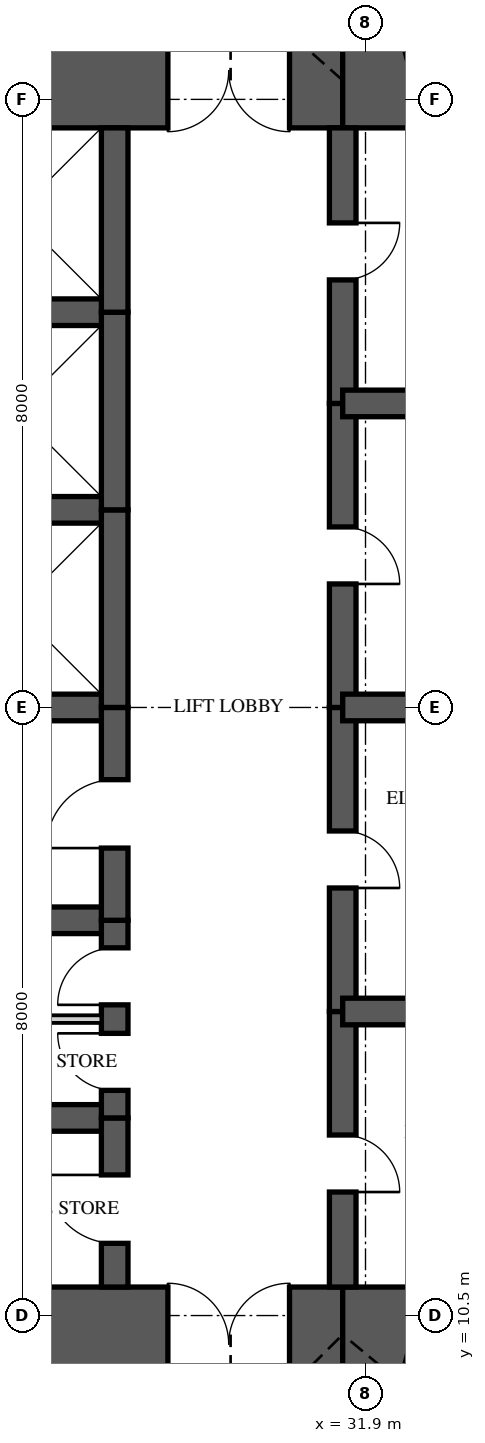
"""IFC4 building model, lengths in metres.
Left out: names, types, materials, properties, quantities, classifications, styles, units other than length and angle.
Written with IfcOpenShell. Run it as: python <this file> out.ifc"""

import sys

from ifc_helpers import new_model, si_unit, direction, frame, frame_2d, origin, place, context, subcontext, project, spatial, rectangle, extrude, element, fill, save


model = new_model("IFC4")
c1 = context("Model", 3, precision=1e-05, world=origin(), true_north=direction((0.0, 1.0)))
c2 = subcontext(c1, "Body", "Model", "MODEL_VIEW")
j1 = project(units=[si_unit("LENGTHUNIT", "METRE"), si_unit("PLANEANGLEUNIT", "RADIAN")], contexts=[c1])
p1 = place(None, origin())
s1 = spatial("IfcSite", under=j1, at=p1, CompositionType="ELEMENT")
p2 = place(p1, origin())
s2 = spatial("IfcBuilding", under=s1, at=p2, CompositionType="ELEMENT")
p3 = place(p2, frame((0.0, 0.0, 149.35)))
s3 = spatial("IfcBuildingStorey", under=s2, at=p3, CompositionType="ELEMENT", Elevation=149.35)
p4 = place(p3, frame((26.0, 10.125, 0.0), z_axis=(0.0, 0.0, 1.0), x_axis=(1.0, 0.0, 0.0)))
e1 = element("IfcWall", 1, at=p4, inside=s3, PredefinedType="SHEAR", context=c2, shape_type="SweptSolid", body=[
    extrude(rectangle(XDim=5.6, YDim=1.5, at=frame_2d((2.8, 0.0))), origin(), (0.0, 0.0, 1.0), 5.0),
])
p5 = place(p4, frame((3.3, 0.0, 0.0)))
e2 = element("IfcOpeningElement", 2, at=p5, cuts=e1, PredefinedType="OPENING", context=c2, shape_type="SweptSolid", body=[
    extrude(rectangle(XDim=1.6, YDim=2.1, at=frame_2d((0.8, 1.05))), frame((0.0, 0.76, 0.0), z_axis=(0.0, -1.0, 0.0), x_axis=(1.0, 0.0, 0.0)), (0.0, 0.0, 1.0), 1.52),
])
for number, where, z_axis, x_axis in (
    (3, (31.6, 10.125, 0.0), (0.0, 0.0, 1.0), (1.0, 0.0, 0.0)),
    (4, (35.9, 26.875, 0.0), (0.0, 0.0, 1.0), (-1.0, 0.0, 0.0)),
):
    element("IfcWall", number, at=place(p3, frame(where, z_axis=z_axis, x_axis=x_axis)), inside=s3, PredefinedType="SHEAR", context=c2, shape_type="SweptSolid", body=[
        extrude(rectangle(XDim=4.3, YDim=1.5, at=frame_2d((2.15, 0.0))), origin(), (0.0, 0.0, 1.0), 5.0),
    ])
p6 = place(p3, frame((31.6, 26.875, 0.0), z_axis=(0.0, 0.0, 1.0), x_axis=(-1.0, 0.0, 0.0)))
e5 = element("IfcWall", 5, at=p6, inside=s3, PredefinedType="SHEAR", context=c2, shape_type="SweptSolid", body=[
    extrude(rectangle(XDim=5.6, YDim=1.5, at=frame_2d((2.8, 0.0))), origin(), (0.0, 0.0, 1.0), 5.0),
])
p7 = place(p6, frame((0.7, 0.0, 0.0)))
e6 = element("IfcOpeningElement", 6, at=p7, cuts=e5, PredefinedType="OPENING", context=c2, shape_type="SweptSolid", body=[
    extrude(rectangle(XDim=1.6, YDim=2.1, at=frame_2d((0.8, 1.05))), frame((0.0, 0.76, 0.0), z_axis=(0.0, -1.0, 0.0), x_axis=(1.0, 0.0, 0.0)), (0.0, 0.0, 1.0), 1.52),
])
p8 = place(p3, frame((28.6, 10.875, 0.0), z_axis=(0.0, 0.0, 1.0), x_axis=(0.0, 1.0, 0.0)))
e7 = element("IfcWall", 7, at=p8, inside=s3, PredefinedType="SHEAR", context=c2, shape_type="SweptSolid", body=[
    extrude(rectangle(XDim=2.225, YDim=0.35, at=frame_2d((1.113, 0.0))), origin(), (0.0, 0.0, 1.0), 5.0),
])
p9 = place(p8, frame((0.575, 0.0, 0.0)))
e8 = element("IfcOpeningElement", 8, at=p9, cuts=e7, PredefinedType="OPENING", context=c2, shape_type="SweptSolid", body=[
    extrude(rectangle(XDim=0.9, YDim=2.1, at=frame_2d((0.45, 1.05))), frame((0.0, 0.185, 0.0), z_axis=(0.0, -1.0, 0.0), x_axis=(1.0, 0.0, 0.0)), (0.0, 0.0, 1.0), 0.37),
])
p10 = place(p3, frame((28.6, 13.1, 0.0), z_axis=(0.0, 0.0, 1.0), x_axis=(0.0, 1.0, 0.0)))
e9 = element("IfcWall", 9, at=p10, inside=s3, PredefinedType="SHEAR", context=c2, shape_type="SweptSolid", body=[
    extrude(rectangle(XDim=2.6, YDim=0.35, at=frame_2d((1.3, 0.0))), origin(), (0.0, 0.0, 1.0), 5.0),
])
p11 = place(p10, frame((0.363, 0.0, 0.0)))
e10 = element("IfcOpeningElement", 10, at=p11, cuts=e9, PredefinedType="OPENING", context=c2, shape_type="SweptSolid", body=[
    extrude(rectangle(XDim=0.75, YDim=2.1, at=frame_2d((0.375, 1.05))), frame((0.0, 0.185, 0.0), z_axis=(0.0, -1.0, 0.0), x_axis=(1.0, 0.0, 0.0)), (0.0, 0.0, 1.0), 0.37),
])
p12 = place(p10, frame((1.488, 0.0, 0.0)))
e11 = element("IfcOpeningElement", 11, at=p12, cuts=e9, PredefinedType="OPENING", context=c2, shape_type="SweptSolid", body=[
    extrude(rectangle(XDim=0.75, YDim=2.1, at=frame_2d((0.375, 1.05))), frame((0.0, 0.185, 0.0), z_axis=(0.0, -1.0, 0.0), x_axis=(1.0, 0.0, 0.0)), (0.0, 0.0, 1.0), 0.37),
])
p13 = place(p3, frame((28.6, 15.7, 0.0), z_axis=(0.0, 0.0, 1.0), x_axis=(0.0, 1.0, 0.0)))
e12 = element("IfcWall", 12, at=p13, inside=s3, PredefinedType="SHEAR", context=c2, shape_type="SweptSolid", body=[
    extrude(rectangle(XDim=2.8, YDim=0.35, at=frame_2d((1.4, 0.0))), origin(), (0.0, 0.0, 1.0), 5.0),
])
p14 = place(p13, frame((0.95, 0.0, 0.0)))
e13 = element("IfcOpeningElement", 13, at=p14, cuts=e12, PredefinedType="OPENING", context=c2, shape_type="SweptSolid", body=[
    extrude(rectangle(XDim=0.9, YDim=2.1, at=frame_2d((0.45, 1.05))), frame((0.0, 0.185, 0.0), z_axis=(0.0, -1.0, 0.0), x_axis=(1.0, 0.0, 0.0)), (0.0, 0.0, 1.0), 0.37),
])
p15 = place(p3, frame((28.6, 18.5, 0.0), z_axis=(0.0, 0.0, 1.0), x_axis=(0.0, 1.0, 0.0)))
e14 = element("IfcWall", 14, at=p15, inside=s3, PredefinedType="SHEAR", context=c2, shape_type="SweptSolid", body=[
    extrude(rectangle(XDim=2.6, YDim=0.35, at=frame_2d((1.3, 0.0))), origin(), (0.0, 0.0, 1.0), 5.0),
])
p16 = place(p3, frame((28.6, 21.1, 0.0), z_axis=(0.0, 0.0, 1.0), x_axis=(0.0, 1.0, 0.0)))
e15 = element("IfcWall", 15, at=p16, inside=s3, PredefinedType="SHEAR", context=c2, shape_type="SweptSolid", body=[
    extrude(rectangle(XDim=2.6, YDim=0.35, at=frame_2d((1.3, 0.0))), origin(), (0.0, 0.0, 1.0), 5.0),
])
p17 = place(p3, frame((28.6, 23.7, 0.0), z_axis=(0.0, 0.0, 1.0), x_axis=(0.0, 1.0, 0.0)))
e16 = element("IfcWall", 16, at=p17, inside=s3, PredefinedType="SHEAR", context=c2, shape_type="SweptSolid", body=[
    extrude(rectangle(XDim=2.425, YDim=0.35, at=frame_2d((1.212, 0.0))), origin(), (0.0, 0.0, 1.0), 5.0),
])
p18 = place(p3, frame((31.6, 10.875, 0.0), z_axis=(0.0, 0.0, 1.0), x_axis=(0.0, 1.0, 0.0)))
e17 = element("IfcWall", 17, at=p18, inside=s3, PredefinedType="SHEAR", context=c2, shape_type="SweptSolid", body=[
    extrude(rectangle(XDim=3.625, YDim=0.35, at=frame_2d((1.812, 0.0))), origin(), (0.0, 0.0, 1.0), 5.0),
])
p19 = place(p18, frame((1.25, 0.0, 0.0)))
e18 = element("IfcOpeningElement", 18, at=p19, cuts=e17, PredefinedType="OPENING", context=c2, shape_type="SweptSolid", body=[
    extrude(rectangle(XDim=0.75, YDim=2.1, at=frame_2d((0.375, 1.05))), frame((0.0, 0.185, 0.0), z_axis=(0.0, -1.0, 0.0), x_axis=(1.0, 0.0, 0.0)), (0.0, 0.0, 1.0), 0.37),
])
p20 = place(p3, frame((31.6, 14.5, 0.0), z_axis=(0.0, 0.0, 1.0), x_axis=(0.0, 1.0, 0.0)))
e19 = element("IfcWall", 19, at=p20, inside=s3, PredefinedType="SHEAR", context=c2, shape_type="SweptSolid", body=[
    extrude(rectangle(XDim=4.0, YDim=0.35, at=frame_2d((2.0, 0.0))), origin(), (0.0, 0.0, 1.0), 5.0),
])
p21 = place(p20, frame((1.625, 0.0, 0.0)))
e20 = element("IfcOpeningElement", 20, at=p21, cuts=e19, PredefinedType="OPENING", context=c2, shape_type="SweptSolid", body=[
    extrude(rectangle(XDim=0.75, YDim=2.1, at=frame_2d((0.375, 1.05))), frame((0.0, 0.185, 0.0), z_axis=(0.0, -1.0, 0.0), x_axis=(1.0, 0.0, 0.0)), (0.0, 0.0, 1.0), 0.37),
])
p22 = place(p3, frame((31.6, 18.5, 0.0), z_axis=(0.0, 0.0, 1.0), x_axis=(0.0, 1.0, 0.0)))
e21 = element("IfcWall", 21, at=p22, inside=s3, PredefinedType="SHEAR", context=c2, shape_type="SweptSolid", body=[
    extrude(rectangle(XDim=4.0, YDim=0.35, at=frame_2d((2.0, 0.0))), origin(), (0.0, 0.0, 1.0), 5.0),
])
p23 = place(p22, frame((1.625, 0.0, 0.0)))
e22 = element("IfcOpeningElement", 22, at=p23, cuts=e21, PredefinedType="OPENING", context=c2, shape_type="SweptSolid", body=[
    extrude(rectangle(XDim=0.75, YDim=2.1, at=frame_2d((0.375, 1.05))), frame((0.0, 0.185, 0.0), z_axis=(0.0, -1.0, 0.0), x_axis=(1.0, 0.0, 0.0)), (0.0, 0.0, 1.0), 0.37),
])
p24 = place(p3, frame((31.6, 22.5, 0.0), z_axis=(0.0, 0.0, 1.0), x_axis=(0.0, 1.0, 0.0)))
e23 = element("IfcWall", 23, at=p24, inside=s3, PredefinedType="SHEAR", context=c2, shape_type="SweptSolid", body=[
    extrude(rectangle(XDim=3.625, YDim=0.35, at=frame_2d((1.812, 0.0))), origin(), (0.0, 0.0, 1.0), 5.0),
])
p25 = place(p24, frame((1.625, 0.0, 0.0)))
e24 = element("IfcOpeningElement", 24, at=p25, cuts=e23, PredefinedType="OPENING", context=c2, shape_type="SweptSolid", body=[
    extrude(rectangle(XDim=0.75, YDim=2.1, at=frame_2d((0.375, 1.05))), frame((0.0, 0.185, 0.0), z_axis=(0.0, -1.0, 0.0), x_axis=(1.0, 0.0, 0.0)), (0.0, 0.0, 1.0), 0.37),
])
for number, where, z_axis, x_axis in (
    (25, (26.0, 13.1, 0.0), (0.0, 0.0, 1.0), (1.0, 0.0, 0.0)),
    (26, (26.0, 15.7, 0.0), (0.0, 0.0, 1.0), (1.0, 0.0, 0.0)),
    (27, (26.0, 18.5, 0.0), (0.0, 0.0, 1.0), (1.0, 0.0, 0.0)),
    (28, (26.0, 21.1, 0.0), (0.0, 0.0, 1.0), (1.0, 0.0, 0.0)),
    (29, (26.0, 23.7, 0.0), (0.0, 0.0, 1.0), (1.0, 0.0, 0.0)),
):
    element("IfcWall", number, at=place(p3, frame(where, z_axis=z_axis, x_axis=x_axis)), inside=s3, PredefinedType="SHEAR", context=c2, shape_type="SweptSolid", body=[
        extrude(rectangle(XDim=2.6, YDim=0.35, at=frame_2d((1.3, 0.0))), origin(), (0.0, 0.0, 1.0), 5.0),
    ])
for number, where, z_axis, x_axis in (
    (30, (31.6, 14.5, 0.0), (0.0, 0.0, 1.0), (1.0, 0.0, 0.0)),
    (31, (31.6, 18.5, 0.0), (0.0, 0.0, 1.0), (1.0, 0.0, 0.0)),
    (32, (31.6, 22.5, 0.0), (0.0, 0.0, 1.0), (1.0, 0.0, 0.0)),
):
    element("IfcWall", number, at=place(p3, frame(where, z_axis=z_axis, x_axis=x_axis)), inside=s3, PredefinedType="SHEAR", context=c2, shape_type="SweptSolid", body=[
        extrude(rectangle(XDim=4.3, YDim=0.35, at=frame_2d((2.15, 0.0))), origin(), (0.0, 0.0, 1.0), 5.0),
    ])
p26 = place(p3, frame((26.175, 14.4, 0.0), z_axis=(0.0, 0.0, 1.0), x_axis=(1.0, 0.0, 0.0)))
e33 = element("IfcWall", 33, at=p26, inside=s3, PredefinedType="PARTITIONING", context=c2, shape_type="SweptSolid", body=[
    extrude(rectangle(XDim=2.25, YDim=0.1, at=frame_2d((1.125, 0.0))), origin(), (0.0, 0.0, 1.0), 4.72),
])
p27 = place(p9, origin())
e34 = element("IfcDoor", 34, at=p27, inside=s3, OperationType="SINGLE_SWING_RIGHT", PredefinedType="DOOR", context=c2, shape_type="SweptSolid", body=[
    extrude(rectangle(XDim=0.9, YDim=2.1, at=frame_2d((0.45, 1.05))), frame((0.0, 0.025, 0.0), z_axis=(0.0, -1.0, 0.0), x_axis=(1.0, 0.0, 0.0)), (0.0, 0.0, 1.0), 0.05),
])
fill(e8, e34)
p28 = place(p11, origin())
e35 = element("IfcDoor", 35, at=p28, inside=s3, OperationType="SINGLE_SWING_RIGHT", PredefinedType="DOOR", context=c2, shape_type="SweptSolid", body=[
    extrude(rectangle(XDim=0.75, YDim=2.1, at=frame_2d((0.375, 1.05))), frame((0.0, 0.025, 0.0), z_axis=(0.0, -1.0, 0.0), x_axis=(1.0, 0.0, 0.0)), (0.0, 0.0, 1.0), 0.05),
])
fill(e10, e35)
p29 = place(p12, origin())
e36 = element("IfcDoor", 36, at=p29, inside=s3, OperationType="SINGLE_SWING_LEFT", PredefinedType="DOOR", context=c2, shape_type="SweptSolid", body=[
    extrude(rectangle(XDim=0.75, YDim=2.1, at=frame_2d((0.375, 1.05))), frame((0.0, 0.025, 0.0), z_axis=(0.0, -1.0, 0.0), x_axis=(1.0, 0.0, 0.0)), (0.0, 0.0, 1.0), 0.05),
])
fill(e11, e36)
p30 = place(p14, origin())
e37 = element("IfcDoor", 37, at=p30, inside=s3, OperationType="SINGLE_SWING_LEFT", PredefinedType="DOOR", context=c2, shape_type="SweptSolid", body=[
    extrude(rectangle(XDim=0.9, YDim=2.1, at=frame_2d((0.45, 1.05))), frame((0.0, 0.025, 0.0), z_axis=(0.0, -1.0, 0.0), x_axis=(1.0, 0.0, 0.0)), (0.0, 0.0, 1.0), 0.05),
])
fill(e13, e37)
p31 = place(p5, origin())
e38 = element("IfcDoor", 38, at=p31, inside=s3, OperationType="DOUBLE_DOOR_SINGLE_SWING", PredefinedType="DOOR", context=c2, shape_type="SweptSolid", body=[
    extrude(rectangle(XDim=1.6, YDim=2.1, at=frame_2d((0.8, 1.05))), frame((0.0, 0.025, 0.0), z_axis=(0.0, -1.0, 0.0), x_axis=(1.0, 0.0, 0.0)), (0.0, 0.0, 1.0), 0.05),
])
fill(e2, e38)
p32 = place(p7, origin())
e39 = element("IfcDoor", 39, at=p32, inside=s3, OperationType="DOUBLE_DOOR_SINGLE_SWING", PredefinedType="DOOR", context=c2, shape_type="SweptSolid", body=[
    extrude(rectangle(XDim=1.6, YDim=2.1, at=frame_2d((0.8, 1.05))), frame((0.0, 0.025, 0.0), z_axis=(0.0, -1.0, 0.0), x_axis=(1.0, 0.0, 0.0)), (0.0, 0.0, 1.0), 0.05),
])
fill(e6, e39)
p33 = place(p19, frame((0.75, 0.0, 0.0), z_axis=(0.0, 0.0, 1.0), x_axis=(-1.0, 0.0, 0.0)))
e40 = element("IfcDoor", 40, at=p33, inside=s3, OperationType="SINGLE_SWING_RIGHT", PredefinedType="DOOR", context=c2, shape_type="SweptSolid", body=[
    extrude(rectangle(XDim=0.75, YDim=2.1, at=frame_2d((0.375, 1.05))), frame((0.0, 0.025, 0.0), z_axis=(0.0, -1.0, 0.0), x_axis=(1.0, 0.0, 0.0)), (0.0, 0.0, 1.0), 0.05),
])
fill(e18, e40)
p34 = place(p21, frame((0.75, 0.0, 0.0), z_axis=(0.0, 0.0, 1.0), x_axis=(-1.0, 0.0, 0.0)))
e41 = element("IfcDoor", 41, at=p34, inside=s3, OperationType="SINGLE_SWING_RIGHT", PredefinedType="DOOR", context=c2, shape_type="SweptSolid", body=[
    extrude(rectangle(XDim=0.75, YDim=2.1, at=frame_2d((0.375, 1.05))), frame((0.0, 0.025, 0.0), z_axis=(0.0, -1.0, 0.0), x_axis=(1.0, 0.0, 0.0)), (0.0, 0.0, 1.0), 0.05),
])
fill(e20, e41)
p35 = place(p23, frame((0.75, 0.0, 0.0), z_axis=(0.0, 0.0, 1.0), x_axis=(-1.0, 0.0, 0.0)))
e42 = element("IfcDoor", 42, at=p35, inside=s3, OperationType="SINGLE_SWING_RIGHT", PredefinedType="DOOR", context=c2, shape_type="SweptSolid", body=[
    extrude(rectangle(XDim=0.75, YDim=2.1, at=frame_2d((0.375, 1.05))), frame((0.0, 0.025, 0.0), z_axis=(0.0, -1.0, 0.0), x_axis=(1.0, 0.0, 0.0)), (0.0, 0.0, 1.0), 0.05),
])
fill(e22, e42)
p36 = place(p25, frame((0.75, 0.0, 0.0), z_axis=(0.0, 0.0, 1.0), x_axis=(-1.0, 0.0, 0.0)))
e43 = element("IfcDoor", 43, at=p36, inside=s3, OperationType="SINGLE_SWING_LEFT", PredefinedType="DOOR", context=c2, shape_type="SweptSolid", body=[
    extrude(rectangle(XDim=0.75, YDim=2.1, at=frame_2d((0.375, 1.05))), frame((0.0, 0.025, 0.0), z_axis=(0.0, -1.0, 0.0), x_axis=(1.0, 0.0, 0.0)), (0.0, 0.0, 1.0), 0.05),
])
fill(e24, e43)
save(model, sys.argv[1])
